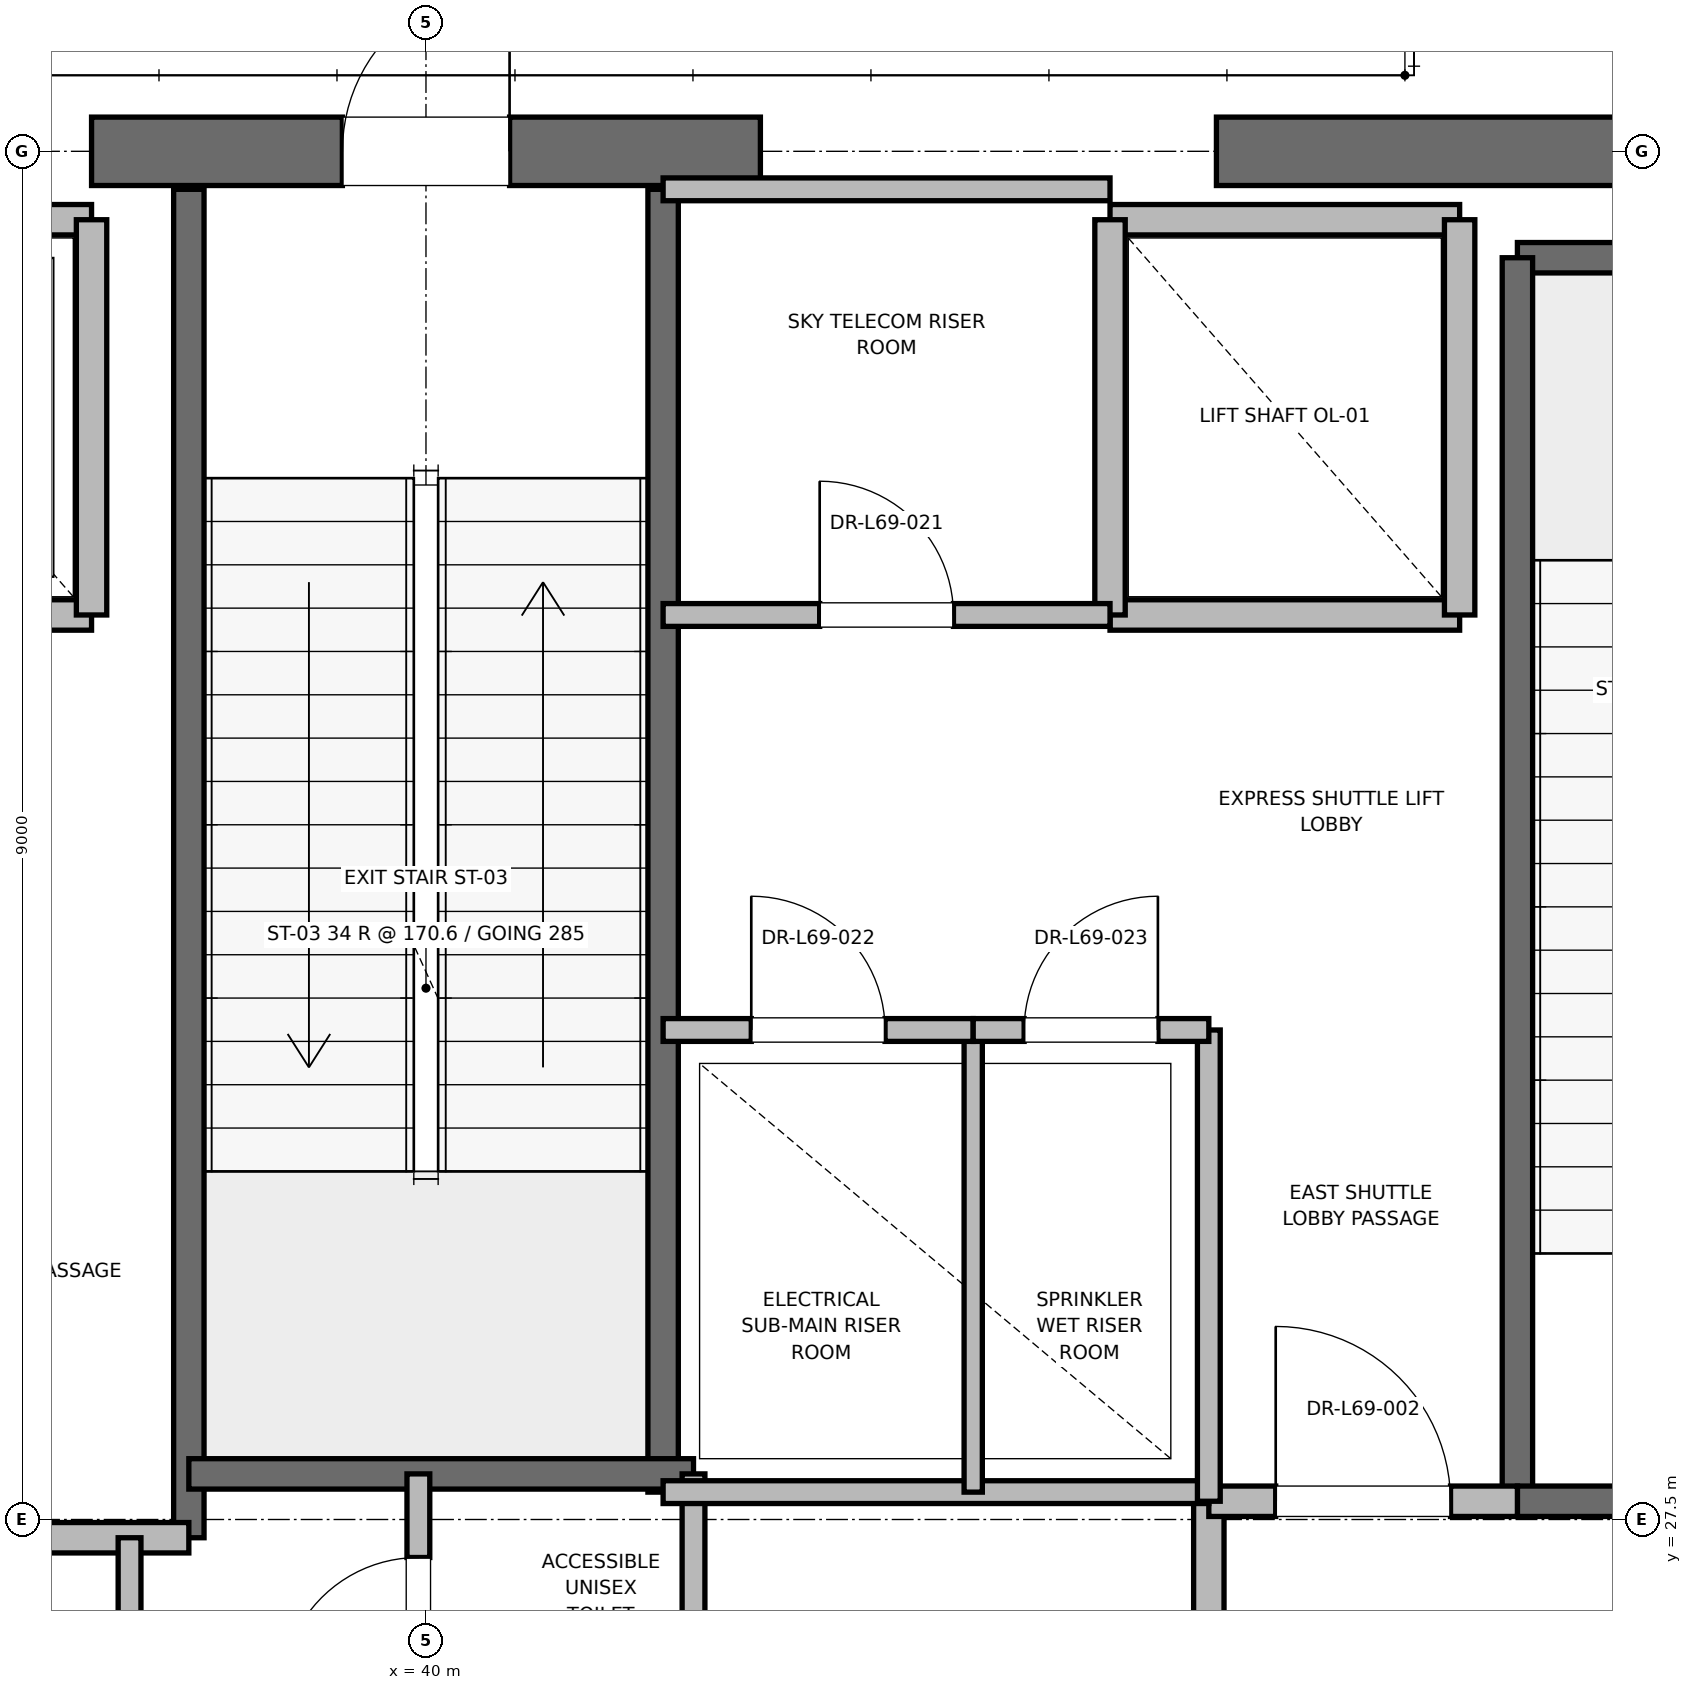
"""IFC4 building model, lengths in metres.
Left out: names, types, materials, properties, quantities, classifications, styles, units other than length and angle.
Written with IfcOpenShell. Run it as: python <this file> out.ifc"""

import sys

from ifc_helpers import new_model, si_unit, direction, frame, frame_2d, origin, place, context, subcontext, project, spatial, rectangle, extrude, element, fill, save


model = new_model("IFC4")
c1 = context("Model", 3, precision=1e-05, world=origin(), true_north=direction((0.0, 1.0)))
c2 = subcontext(c1, "Body", "Model", "MODEL_VIEW")
j1 = project(units=[si_unit("LENGTHUNIT", "METRE"), si_unit("PLANEANGLEUNIT", "RADIAN")], contexts=[c1])
p1 = place(None, origin())
s1 = spatial("IfcSite", under=j1, at=p1, CompositionType="ELEMENT")
p2 = place(p1, origin())
s2 = spatial("IfcBuilding", under=s1, at=p2, CompositionType="ELEMENT")
p3 = place(p2, frame((0.0, 0.0, 295.2)))
s3 = spatial("IfcBuildingStorey", under=s2, at=p3, CompositionType="ELEMENT", Elevation=295.2)
p4 = place(p3, frame((37.8, 36.5, 0.0), z_axis=(0.0, 0.0, 1.0), x_axis=(1.0, 0.0, 0.0)))
e1 = element("IfcWall", 1, at=p4, inside=s3, PredefinedType="SHEAR", context=c2, shape_type="SweptSolid", body=[
    extrude(rectangle(XDim=4.4, YDim=0.45, at=frame_2d((2.2, 0.0))), origin(), (0.0, 0.0, 1.0), 5.5),
])
p5 = place(p4, frame((1.65, 0.0, 0.0)))
e2 = element("IfcOpeningElement", 2, at=p5, cuts=e1, PredefinedType="OPENING", context=c2, shape_type="SweptSolid", body=[
    extrude(rectangle(XDim=1.1, YDim=2.15, at=frame_2d((0.55, 1.075))), frame((0.0, 0.225, 0.0), z_axis=(0.0, -1.0, 0.0), x_axis=(1.0, 0.0, 0.0)), (0.0, 0.0, 1.0), 0.45),
])
p6 = place(p3, frame((45.2, 36.5, 0.0), z_axis=(0.0, 0.0, 1.0), x_axis=(1.0, 0.0, 0.0)))
e3 = element("IfcWall", 3, at=p6, inside=s3, PredefinedType="SHEAR", context=c2, shape_type="SweptSolid", body=[
    extrude(rectangle(XDim=5.8, YDim=0.45, at=frame_2d((2.9, 0.0))), origin(), (0.0, 0.0, 1.0), 5.5),
])
p7 = place(p3, frame((47.18, 35.8, 0.0), z_axis=(0.0, 0.0, 1.0), x_axis=(1.0, 0.0, 0.0)))
e4 = element("IfcWall", 4, at=p7, inside=s3, PredefinedType="SOLIDWALL", context=c2, shape_type="SweptSolid", body=[
    extrude(rectangle(XDim=3.12, YDim=0.2, at=frame_2d((1.56, 0.0))), origin(), (0.0, 0.0, 1.0), 5.5),
])
p8 = place(p3, frame((47.18, 27.62, 0.0), z_axis=(0.0, 0.0, 1.0), x_axis=(0.0, 1.0, 0.0)))
e5 = element("IfcWall", 5, at=p8, inside=s3, PredefinedType="SOLIDWALL", context=c2, shape_type="SweptSolid", body=[
    extrude(rectangle(XDim=8.18, YDim=0.2, at=frame_2d((4.09, 0.0))), origin(), (0.0, 0.0, 1.0), 5.5),
])
p9 = place(p3, frame((47.18, 27.62, 0.0), z_axis=(0.0, 0.0, 1.0), x_axis=(1.0, 0.0, 0.0)))
e6 = element("IfcWall", 6, at=p9, inside=s3, PredefinedType="SOLIDWALL", context=c2, shape_type="SweptSolid", body=[
    extrude(rectangle(XDim=3.12, YDim=0.2, at=frame_2d((1.56, 0.0))), origin(), (0.0, 0.0, 1.0), 5.5),
])
p10 = place(p9, frame((1.01, 0.0, 0.0)))
e7 = element("IfcOpeningElement", 7, at=p10, cuts=e6, PredefinedType="OPENING", context=c2, shape_type="SweptSolid", body=[
    extrude(rectangle(XDim=1.1, YDim=2.15, at=frame_2d((0.55, 1.075))), frame((0.0, 0.1, 0.0), z_axis=(0.0, -1.0, 0.0), x_axis=(1.0, 0.0, 0.0)), (0.0, 0.0, 1.0), 0.2),
])
p11 = place(p3, frame((38.44, 27.38, 0.0), z_axis=(0.0, 0.0, 1.0), x_axis=(0.0, 1.0, 0.0)))
e8 = element("IfcWall", 8, at=p11, inside=s3, PredefinedType="SOLIDWALL", context=c2, shape_type="SweptSolid", body=[
    extrude(rectangle(XDim=8.87, YDim=0.2, at=frame_2d((4.435, 0.0))), origin(), (0.0, 0.0, 1.0), 5.5),
])
p12 = place(p3, frame((41.56, 27.68, 0.0), z_axis=(0.0, 0.0, 1.0), x_axis=(0.0, 1.0, 0.0)))
e9 = element("IfcWall", 9, at=p12, inside=s3, PredefinedType="SOLIDWALL", context=c2, shape_type="SweptSolid", body=[
    extrude(rectangle(XDim=8.57, YDim=0.2, at=frame_2d((4.285, 0.0))), origin(), (0.0, 0.0, 1.0), 5.5),
])
p13 = place(p3, frame((38.44, 27.8, 0.0), z_axis=(0.0, 0.0, 1.0), x_axis=(1.0, 0.0, 0.0)))
e10 = element("IfcWall", 10, at=p13, inside=s3, PredefinedType="SOLIDWALL", context=c2, shape_type="SweptSolid", body=[
    extrude(rectangle(XDim=3.32, YDim=0.2, at=frame_2d((1.66, 0.0))), origin(), (0.0, 0.0, 1.0), 5.5),
])
p14 = place(p3, frame((32.82, 27.38, 0.0), z_axis=(0.0, 0.0, 1.0), x_axis=(1.0, 0.0, 0.0)))
e11 = element("IfcWall", 11, at=p14, inside=s3, PredefinedType="PARTITIONING", context=c2, shape_type="SweptSolid", body=[
    extrude(rectangle(XDim=5.62, YDim=0.2, at=frame_2d((2.81, 0.0))), origin(), (0.0, 0.0, 1.0), 5.5),
])
p15 = place(p3, frame((45.15, 24.25, 0.0), z_axis=(0.0, 0.0, 1.0), x_axis=(0.0, 1.0, 0.0)))
e12 = element("IfcWall", 12, at=p15, inside=s3, PredefinedType="PARTITIONING", context=c2, shape_type="SweptSolid", body=[
    extrude(rectangle(XDim=3.37, YDim=0.2, at=frame_2d((1.685, 0.0))), origin(), (0.0, 0.0, 1.0), 5.5),
])
p16 = place(p3, frame((45.15, 27.62, 0.0), z_axis=(0.0, 0.0, 1.0), x_axis=(1.0, 0.0, 0.0)))
e13 = element("IfcWall", 13, at=p16, inside=s3, PredefinedType="PARTITIONING", context=c2, shape_type="SweptSolid", body=[
    extrude(rectangle(XDim=2.03, YDim=0.2, at=frame_2d((1.015, 0.0))), origin(), (0.0, 0.0, 1.0), 5.5),
])
p17 = place(p16, frame((0.44, 0.0, 0.0)))
e14 = element("IfcOpeningElement", 14, at=p17, cuts=e13, PredefinedType="OPENING", context=c2, shape_type="SweptSolid", body=[
    extrude(rectangle(XDim=1.15, YDim=2.2, at=frame_2d((0.575, 1.1))), frame((0.0, 0.1, 0.0), z_axis=(0.0, -1.0, 0.0), x_axis=(1.0, 0.0, 0.0)), (0.0, 0.0, 1.0), 0.2),
])
p18 = place(p3, frame((35.5, 33.45, 0.0), z_axis=(0.0, 0.0, 1.0), x_axis=(1.0, 0.0, 0.0)))
e15 = element("IfcWall", 15, at=p18, inside=s3, PredefinedType="SOLIDWALL", context=c2, shape_type="SweptSolid", body=[
    extrude(rectangle(XDim=2.3, YDim=0.2, at=frame_2d((1.15, 0.0))), origin(), (0.0, 0.0, 1.0), 5.5),
])
p19 = place(p18, frame((0.6, 0.0, 0.0)))
e16 = element("IfcOpeningElement", 16, at=p19, cuts=e15, PredefinedType="OPENING", context=c2, shape_type="SweptSolid", body=[
    extrude(rectangle(XDim=1.1, YDim=2.2, at=frame_2d((0.55, 1.1))), frame((0.0, 0.1, 0.0), z_axis=(0.0, -1.0, 0.0), x_axis=(1.0, 0.0, 0.0)), (0.0, 0.0, 1.0), 0.2),
])
p20 = place(p3, frame((37.8, 36.05, 0.0), z_axis=(0.0, 0.0, 1.0), x_axis=(-1.0, 0.0, 0.0)))
e17 = element("IfcWall", 17, at=p20, inside=s3, PredefinedType="SOLIDWALL", context=c2, shape_type="SweptSolid", body=[
    extrude(rectangle(XDim=2.3, YDim=0.2, at=frame_2d((1.15, 0.0))), origin(), (0.0, 0.0, 1.0), 4.58),
])
p21 = place(p3, frame((37.8, 33.45, 0.0), z_axis=(0.0, 0.0, 1.0), x_axis=(0.0, 1.0, 0.0)))
e18 = element("IfcWall", 18, at=p21, inside=s3, PredefinedType="SOLIDWALL", context=c2, shape_type="SweptSolid", body=[
    extrude(rectangle(XDim=2.6, YDim=0.2, at=frame_2d((1.3, 0.0))), origin(), (0.0, 0.0, 1.0), 4.58),
])
p22 = place(p3, frame((44.5, 33.45, 0.0), z_axis=(0.0, 0.0, 1.0), x_axis=(1.0, 0.0, 0.0)))
e19 = element("IfcWall", 19, at=p22, inside=s3, PredefinedType="SOLIDWALL", context=c2, shape_type="SweptSolid", body=[
    extrude(rectangle(XDim=2.3, YDim=0.2, at=frame_2d((1.15, 0.0))), origin(), (0.0, 0.0, 1.0), 5.5),
])
p23 = place(p3, frame((46.8, 36.05, 0.0), z_axis=(0.0, 0.0, 1.0), x_axis=(-1.0, 0.0, 0.0)))
e20 = element("IfcWall", 20, at=p23, inside=s3, PredefinedType="SOLIDWALL", context=c2, shape_type="SweptSolid", body=[
    extrude(rectangle(XDim=2.3, YDim=0.2, at=frame_2d((1.15, 0.0))), origin(), (0.0, 0.0, 1.0), 4.58),
])
p24 = place(p3, frame((44.5, 36.05, 0.0), z_axis=(0.0, 0.0, 1.0), x_axis=(0.0, -1.0, 0.0)))
e21 = element("IfcWall", 21, at=p24, inside=s3, PredefinedType="SOLIDWALL", context=c2, shape_type="SweptSolid", body=[
    extrude(rectangle(XDim=2.6, YDim=0.2, at=frame_2d((1.3, 0.0))), origin(), (0.0, 0.0, 1.0), 4.58),
])
p25 = place(p3, frame((46.8, 33.45, 0.0), z_axis=(0.0, 0.0, 1.0), x_axis=(0.0, 1.0, 0.0)))
e22 = element("IfcWall", 22, at=p25, inside=s3, PredefinedType="SOLIDWALL", context=c2, shape_type="SweptSolid", body=[
    extrude(rectangle(XDim=2.6, YDim=0.2, at=frame_2d((1.3, 0.0))), origin(), (0.0, 0.0, 1.0), 5.5),
])
p26 = place(p3, frame((41.76, 23.8, 0.0), z_axis=(0.0, 0.0, 1.0), x_axis=(0.0, 1.0, 0.0)))
e23 = element("IfcWall", 23, at=p26, inside=s3, PredefinedType="PARTITIONING", context=c2, shape_type="SweptSolid", body=[
    extrude(rectangle(XDim=4.0, YDim=0.15, at=frame_2d((2.0, 0.0))), origin(), (0.0, 0.0, 1.0), 2.85),
])
p27 = place(p3, frame((39.95, 25.8, 0.0), z_axis=(0.0, 0.0, 1.0), x_axis=(0.0, 1.0, 0.0)))
e24 = element("IfcWall", 24, at=p27, inside=s3, PredefinedType="PARTITIONING", context=c2, shape_type="SweptSolid", body=[
    extrude(rectangle(XDim=2.0, YDim=0.15, at=frame_2d((1.0, 0.0))), origin(), (0.0, 0.0, 1.0), 2.85),
])
p28 = place(p27, frame((0.55, 0.0, 0.0)))
e25 = element("IfcOpeningElement", 25, at=p28, cuts=e24, PredefinedType="OPENING", context=c2, shape_type="SweptSolid", body=[
    extrude(rectangle(XDim=0.9, YDim=2.1, at=frame_2d((0.45, 1.05))), frame((0.0, 0.075, 0.0), z_axis=(0.0, -1.0, 0.0), x_axis=(1.0, 0.0, 0.0)), (0.0, 0.0, 1.0), 0.15),
])
p29 = place(p3, frame((38.05, 24.5, 0.0), z_axis=(0.0, 0.0, 1.0), x_axis=(0.0, 1.0, 0.0)))
e26 = element("IfcWall", 26, at=p29, inside=s3, PredefinedType="PARTITIONING", context=c2, shape_type="SweptSolid", body=[
    extrude(rectangle(XDim=2.88, YDim=0.15, at=frame_2d((1.44, 0.0))), origin(), (0.0, 0.0, 1.0), 2.85),
])
p30 = place(p29, frame((1.0, 0.0, 0.0)))
e27 = element("IfcOpeningElement", 27, at=p30, cuts=e26, PredefinedType="OPENING", context=c2, shape_type="SweptSolid", body=[
    extrude(rectangle(XDim=0.88, YDim=2.1, at=frame_2d((0.44, 1.05))), frame((0.0, 0.075, 0.0), z_axis=(0.0, -1.0, 0.0), x_axis=(1.0, 0.0, 0.0)), (0.0, 0.0, 1.0), 0.15),
])
p31 = place(p3, frame((41.56, 27.68, 0.0), z_axis=(0.0, 0.0, 1.0), x_axis=(1.0, 0.0, 0.0)))
e28 = element("IfcWall", 28, at=p31, inside=s3, PredefinedType="PARTITIONING", context=c2, shape_type="SweptSolid", body=[
    extrude(rectangle(XDim=3.59, YDim=0.15, at=frame_2d((1.795, 0.0))), origin(), (0.0, 0.0, 1.0), 2.85),
])
p32 = place(p3, frame((45.15, 27.62, 0.0), z_axis=(0.0, 0.0, 1.0), x_axis=(0.0, 1.0, 0.0)))
e29 = element("IfcWall", 29, at=p32, inside=s3, PredefinedType="PARTITIONING", context=c2, shape_type="SweptSolid", body=[
    extrude(rectangle(XDim=3.1, YDim=0.15, at=frame_2d((1.55, 0.0))), origin(), (0.0, 0.0, 1.0), 2.85),
])
p33 = place(p3, frame((43.6, 27.68, 0.0), z_axis=(0.0, 0.0, 1.0), x_axis=(0.0, 1.0, 0.0)))
e30 = element("IfcWall", 30, at=p33, inside=s3, PredefinedType="PARTITIONING", context=c2, shape_type="SweptSolid", body=[
    extrude(rectangle(XDim=3.04, YDim=0.12, at=frame_2d((1.52, 0.0))), origin(), (0.0, 0.0, 1.0), 2.85),
])
p34 = place(p3, frame((41.56, 30.72, 0.0), z_axis=(0.0, 0.0, 1.0), x_axis=(1.0, 0.0, 0.0)))
e31 = element("IfcWall", 31, at=p34, inside=s3, PredefinedType="PARTITIONING", context=c2, shape_type="SweptSolid", body=[
    extrude(rectangle(XDim=2.04, YDim=0.15, at=frame_2d((1.02, 0.0))), origin(), (0.0, 0.0, 1.0), 2.85),
])
p35 = place(p34, frame((0.58, 0.0, 0.0)))
e32 = element("IfcOpeningElement", 32, at=p35, cuts=e31, PredefinedType="OPENING", context=c2, shape_type="SweptSolid", body=[
    extrude(rectangle(XDim=0.88, YDim=2.1, at=frame_2d((0.44, 1.05))), frame((0.0, 0.075, 0.0), z_axis=(0.0, -1.0, 0.0), x_axis=(1.0, 0.0, 0.0)), (0.0, 0.0, 1.0), 0.15),
])
p36 = place(p3, frame((43.6, 30.72, 0.0), z_axis=(0.0, 0.0, 1.0), x_axis=(1.0, 0.0, 0.0)))
e33 = element("IfcWall", 33, at=p36, inside=s3, PredefinedType="PARTITIONING", context=c2, shape_type="SweptSolid", body=[
    extrude(rectangle(XDim=1.55, YDim=0.15, at=frame_2d((0.775, 0.0))), origin(), (0.0, 0.0, 1.0), 2.85),
])
p37 = place(p36, frame((0.335, 0.0, 0.0)))
e34 = element("IfcOpeningElement", 34, at=p37, cuts=e33, PredefinedType="OPENING", context=c2, shape_type="SweptSolid", body=[
    extrude(rectangle(XDim=0.88, YDim=2.1, at=frame_2d((0.44, 1.05))), frame((0.0, 0.075, 0.0), z_axis=(0.0, -1.0, 0.0), x_axis=(1.0, 0.0, 0.0)), (0.0, 0.0, 1.0), 0.15),
])
p38 = place(p3, frame((41.56, 36.25, 0.0), z_axis=(0.0, 0.0, 1.0), x_axis=(1.0, 0.0, 0.0)))
e35 = element("IfcWall", 35, at=p38, inside=s3, PredefinedType="PARTITIONING", context=c2, shape_type="SweptSolid", body=[
    extrude(rectangle(XDim=2.94, YDim=0.15, at=frame_2d((1.47, 0.0))), origin(), (0.0, 0.0, 1.0), 2.85),
])
p39 = place(p3, frame((41.56, 33.45, 0.0), z_axis=(0.0, 0.0, 1.0), x_axis=(1.0, 0.0, 0.0)))
e36 = element("IfcWall", 36, at=p39, inside=s3, PredefinedType="PARTITIONING", context=c2, shape_type="SweptSolid", body=[
    extrude(rectangle(XDim=2.94, YDim=0.15, at=frame_2d((1.47, 0.0))), origin(), (0.0, 0.0, 1.0), 2.85),
])
p40 = place(p39, frame((1.03, 0.0, 0.0)))
e37 = element("IfcOpeningElement", 37, at=p40, cuts=e36, PredefinedType="OPENING", context=c2, shape_type="SweptSolid", body=[
    extrude(rectangle(XDim=0.88, YDim=2.1, at=frame_2d((0.44, 1.05))), frame((0.0, 0.075, 0.0), z_axis=(0.0, -1.0, 0.0), x_axis=(1.0, 0.0, 0.0)), (0.0, 0.0, 1.0), 0.15),
])
p41 = place(p5, origin())
e38 = element("IfcDoor", 38, at=p41, inside=s3, OperationType="SINGLE_SWING_RIGHT", PredefinedType="DOOR", context=c2, shape_type="SweptSolid", body=[
    extrude(rectangle(XDim=1.1, YDim=2.15, at=frame_2d((0.55, 1.075))), frame((0.0, 0.025, 0.0), z_axis=(0.0, -1.0, 0.0), x_axis=(1.0, 0.0, 0.0)), (0.0, 0.0, 1.0), 0.05),
])
fill(e2, e38)
p42 = place(p17, origin())
e39 = element("IfcDoor", 39, at=p42, inside=s3, OperationType="SINGLE_SWING_LEFT", PredefinedType="DOOR", context=c2, shape_type="SweptSolid", body=[
    extrude(rectangle(XDim=1.15, YDim=2.2, at=frame_2d((0.575, 1.1))), frame((0.0, 0.025, 0.0), z_axis=(0.0, -1.0, 0.0), x_axis=(1.0, 0.0, 0.0)), (0.0, 0.0, 1.0), 0.05),
])
fill(e14, e39)
p43 = place(p28, origin())
e40 = element("IfcDoor", 40, at=p43, inside=s3, OperationType="SINGLE_SWING_LEFT", PredefinedType="DOOR", context=c2, shape_type="SweptSolid", body=[
    extrude(rectangle(XDim=0.9, YDim=2.1, at=frame_2d((0.45, 1.05))), frame((0.0, 0.025, 0.0), z_axis=(0.0, -1.0, 0.0), x_axis=(1.0, 0.0, 0.0)), (0.0, 0.0, 1.0), 0.05),
])
fill(e25, e40)
p44 = place(p35, origin())
e41 = element("IfcDoor", 41, at=p44, inside=s3, OperationType="SINGLE_SWING_LEFT", PredefinedType="DOOR", context=c2, shape_type="SweptSolid", body=[
    extrude(rectangle(XDim=0.88, YDim=2.1, at=frame_2d((0.44, 1.05))), frame((0.0, 0.025, 0.0), z_axis=(0.0, -1.0, 0.0), x_axis=(1.0, 0.0, 0.0)), (0.0, 0.0, 1.0), 0.05),
])
fill(e32, e41)
p45 = place(p37, origin())
e42 = element("IfcDoor", 42, at=p45, inside=s3, OperationType="SINGLE_SWING_RIGHT", PredefinedType="DOOR", context=c2, shape_type="SweptSolid", body=[
    extrude(rectangle(XDim=0.88, YDim=2.1, at=frame_2d((0.44, 1.05))), frame((0.0, 0.025, 0.0), z_axis=(0.0, -1.0, 0.0), x_axis=(1.0, 0.0, 0.0)), (0.0, 0.0, 1.0), 0.05),
])
fill(e34, e42)
p46 = place(p40, origin())
e43 = element("IfcDoor", 43, at=p46, inside=s3, OperationType="SINGLE_SWING_LEFT", PredefinedType="DOOR", context=c2, shape_type="SweptSolid", body=[
    extrude(rectangle(XDim=0.88, YDim=2.1, at=frame_2d((0.44, 1.05))), frame((0.0, 0.025, 0.0), z_axis=(0.0, -1.0, 0.0), x_axis=(1.0, 0.0, 0.0)), (0.0, 0.0, 1.0), 0.05),
])
fill(e37, e43)
save(model, sys.argv[1])
